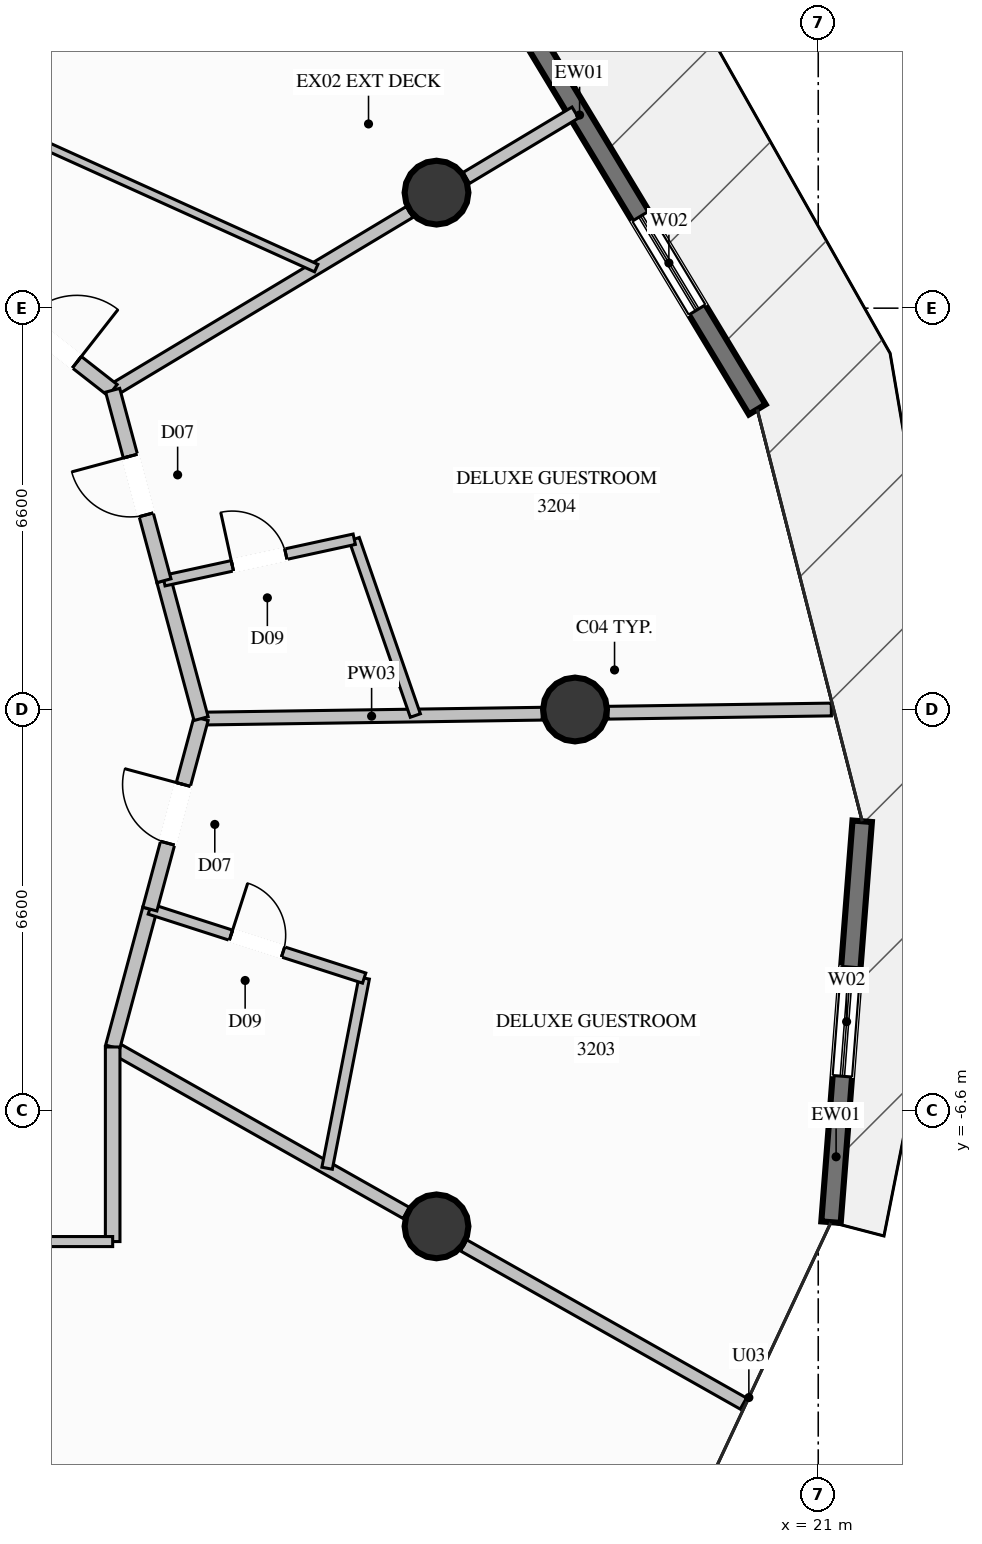
"""IFC4 building model, lengths in metres.
Left out: names, types, materials, properties, quantities, classifications, styles, units other than length and angle.
Written with IfcOpenShell. Run it as: python <this file> out.ifc"""

import sys

from ifc_helpers import new_model, si_unit, direction, frame, frame_2d, origin, origin_2d, place, context, subcontext, project, spatial, rectangle, circle, extrude, element, fill, save


model = new_model("IFC4")
c1 = context("Model", 3, precision=1e-05, world=origin(), true_north=direction((0.0, 1.0)))
c2 = subcontext(c1, "Body", "Model", "MODEL_VIEW")
j1 = project(units=[si_unit("LENGTHUNIT", "METRE"), si_unit("PLANEANGLEUNIT", "RADIAN")], contexts=[c1])
p1 = place(None, origin())
s1 = spatial("IfcSite", under=j1, at=p1, CompositionType="ELEMENT")
p2 = place(p1, origin())
s2 = spatial("IfcBuilding", under=s1, at=p2, CompositionType="ELEMENT")
p3 = place(p2, frame((0.0, 0.0, 120.6)))
s3 = spatial("IfcBuildingStorey", under=s2, at=p3, CompositionType="ELEMENT", Elevation=120.6)
for number, where, z_axis, x_axis in (
    (1, (17.0, 0.0, 0.0), (0.0, 0.0, 1.0), (1.0, 0.0, 0.0)),
    (2, (14.722, 8.5, 0.0), (0.0, 0.0, 1.0), (1.0, 0.0, 0.0)),
    (3, (14.722, -8.5, 0.0), (0.0, 0.0, 1.0), (1.0, 0.0, 0.0)),
):
    element("IfcColumn", number, at=place(p3, frame(where, z_axis=z_axis, x_axis=x_axis)), inside=s3, PredefinedType="COLUMN", context=c2, shape_type="SweptSolid", body=[
        extrude(circle(Radius=0.525, at=origin_2d()), origin(), (0.0, 0.0, 1.0), 3.6),
    ])
p4 = place(p3, frame((21.723, -1.838, 0.0), z_axis=(0.0, 0.0, 1.0), x_axis=(-0.077566011703, -0.996987218488, 0.0)))
e4 = element("IfcWall", 4, at=p4, inside=s3, PredefinedType="SOLIDWALL", context=c2, shape_type="SweptSolid", body=[
    extrude(rectangle(XDim=6.613, YDim=0.32, at=frame_2d((3.307, 0.0))), origin(), (0.0, 0.0, 1.0), 3.35),
])
p5 = place(p4, frame((2.406, 0.0, 0.35)))
e5 = element("IfcOpeningElement", 5, at=p5, cuts=e4, PredefinedType="OPENING", context=c2, shape_type="SweptSolid", body=[
    extrude(rectangle(XDim=1.8, YDim=2.6, at=frame_2d((0.9, 1.3))), frame((0.0, 0.17, 0.0), z_axis=(0.0, -1.0, 0.0), x_axis=(1.0, 0.0, 0.0)), (0.0, 0.0, 1.0), 0.34),
])
p6 = place(p3, frame((16.201, 11.225, 0.0), z_axis=(0.0, 0.0, 1.0), x_axis=(0.516707807554, -0.856161808079, 0.0)))
e6 = element("IfcWall", 6, at=p6, inside=s3, PredefinedType="SOLIDWALL", context=c2, shape_type="SweptSolid", body=[
    extrude(rectangle(XDim=7.347, YDim=0.32, at=frame_2d((3.673, 0.0))), origin(), (0.0, 0.0, 1.0), 3.35),
])
p7 = place(p6, frame((3.634, 0.0, 0.35)))
e7 = element("IfcOpeningElement", 7, at=p7, cuts=e6, PredefinedType="OPENING", context=c2, shape_type="SweptSolid", body=[
    extrude(rectangle(XDim=1.8, YDim=2.6, at=frame_2d((0.9, 1.3))), frame((0.0, 0.17, 0.0), z_axis=(0.0, -1.0, 0.0), x_axis=(1.0, 0.0, 0.0)), (0.0, 0.0, 1.0), 0.34),
])
p8 = place(p3, frame((10.85, -0.15, 0.0), z_axis=(0.0, 0.0, 1.0), x_axis=(0.999896226814, 0.014406096068, 0.0)))
e8 = element("IfcWall", 8, at=p8, inside=s3, PredefinedType="PARTITIONING", context=c2, shape_type="SweptSolid", body=[
    extrude(rectangle(XDim=5.609, YDim=0.21, at=frame_2d((2.805, 0.0))), origin(), (0.0, 0.0, 1.0), 3.35),
])
p9 = place(p3, frame((17.542, -0.053, 0.0), z_axis=(0.0, 0.0, 1.0), x_axis=(0.999895999044, 0.01442189643, 0.0)))
e9 = element("IfcWall", 9, at=p9, inside=s3, PredefinedType="PARTITIONING", context=c2, shape_type="SweptSolid", body=[
    extrude(rectangle(XDim=3.674, YDim=0.21, at=frame_2d((1.837, 0.0))), origin(), (0.0, 0.0, 1.0), 3.35),
])
p10 = place(p3, frame((9.396, 5.25, 0.0), z_axis=(0.0, 0.0, 1.0), x_axis=(0.857379456535, 0.514684823471, 0.0)))
e10 = element("IfcWall", 10, at=p10, inside=s3, PredefinedType="PARTITIONING", context=c2, shape_type="SweptSolid", body=[
    extrude(rectangle(XDim=5.697, YDim=0.21, at=frame_2d((2.848, 0.0))), origin(), (0.0, 0.0, 1.0), 2.719),
])
p11 = place(p3, frame((15.211, 8.741, 0.0), z_axis=(0.0, 0.0, 1.0), x_axis=(0.857462017951, 0.514547264857, 0.0)))
e11 = element("IfcWall", 11, at=p11, inside=s3, PredefinedType="PARTITIONING", context=c2, shape_type="SweptSolid", body=[
    extrude(rectangle(XDim=2.091, YDim=0.21, at=frame_2d((1.045, 0.0))), origin(), (0.0, 0.0, 1.0), 3.35),
])
p12 = place(p3, frame((9.396, -5.55, 0.0), z_axis=(0.0, 0.0, 1.0), x_axis=(0.870557919432, -0.492065959922, 0.0)))
e12 = element("IfcWall", 12, at=p12, inside=s3, PredefinedType="PARTITIONING", context=c2, shape_type="SweptSolid", body=[
    extrude(rectangle(XDim=5.546, YDim=0.21, at=frame_2d((2.773, 0.0))), origin(), (0.0, 0.0, 1.0), 2.719),
])
p13 = place(p3, frame((15.168, -8.813, 0.0), z_axis=(0.0, 0.0, 1.0), x_axis=(0.870524982939, -0.492124226267, 0.0)))
e13 = element("IfcWall", 13, at=p13, inside=s3, PredefinedType="PARTITIONING", context=c2, shape_type="SweptSolid", body=[
    extrude(rectangle(XDim=5.285, YDim=0.21, at=frame_2d((2.643, 0.0))), origin(), (0.0, 0.0, 1.0), 3.35),
])
p14 = place(p3, frame((7.35, 6.85, 0.0), z_axis=(0.0, 0.0, 1.0), x_axis=(0.7876993483, -0.6160598483, 0.0)))
e14 = element("IfcWall", 14, at=p14, inside=s3, PredefinedType="PARTITIONING", context=c2, shape_type="SweptSolid", body=[
    extrude(rectangle(XDim=2.597, YDim=0.24, at=frame_2d((1.299, 0.0))), origin(), (0.0, 0.0, 1.0), 3.35),
])
p15 = place(p14, frame((0.749, 0.0, 0.0)))
e15 = element("IfcOpeningElement", 15, at=p15, cuts=e14, PredefinedType="OPENING", context=c2, shape_type="SweptSolid", body=[
    extrude(rectangle(XDim=1.1, YDim=2.3, at=frame_2d((0.55, 1.15))), frame((0.0, 0.13, 0.0), z_axis=(0.0, -1.0, 0.0), x_axis=(1.0, 0.0, 0.0)), (0.0, 0.0, 1.0), 0.26),
])
p16 = place(p3, frame((0.0, 13.023, 0.0), z_axis=(0.0, 0.0, 1.0), x_axis=(0.911139602209, -0.412097834605, 0.0)))
e16 = element("IfcWall", 16, at=p16, inside=s3, PredefinedType="PARTITIONING", context=c2, shape_type="SweptSolid", body=[
    extrude(rectangle(XDim=13.987, YDim=0.135, at=frame_2d((6.993, 0.0))), origin(), (0.0, 0.0, 1.0), 3.35),
])
p17 = place(p16, frame((6.518, 0.0, 0.0)))
e17 = element("IfcOpeningElement", 17, at=p17, cuts=e16, PredefinedType="OPENING", context=c2, shape_type="SweptSolid", body=[
    extrude(rectangle(XDim=0.95, YDim=2.1, at=frame_2d((0.475, 1.05))), frame((0.0, 0.078, 0.0), z_axis=(0.0, -1.0, 0.0), x_axis=(1.0, 0.0, 0.0)), (0.0, 0.0, 1.0), 0.155),
])
p18 = place(p3, frame((9.396, -5.55, 0.0), z_axis=(0.0, 0.0, 1.0), x_axis=(0.260152382661, 0.965567572879, 0.0)))
e18 = element("IfcWall", 18, at=p18, inside=s3, PredefinedType="PARTITIONING", context=c2, shape_type="SweptSolid", body=[
    extrude(rectangle(XDim=2.349, YDim=0.24, at=frame_2d((1.174, 0.0))), origin(), (0.0, 0.0, 1.0), 3.35),
])
p19 = place(p3, frame((12.923, -7.544, 0.0), z_axis=(0.0, 0.0, 1.0), x_axis=(0.191132211705, 0.981564301332, 0.0)))
e19 = element("IfcWall", 19, at=p19, inside=s3, PredefinedType="PLUMBINGWALL", context=c2, shape_type="SweptSolid", body=[
    extrude(rectangle(XDim=3.186, YDim=0.175, at=frame_2d((1.593, 0.0))), origin(), (0.0, 0.0, 1.0), 3.35),
])
p20 = place(p3, frame((10.007, -3.282, 0.0), z_axis=(0.0, 0.0, 1.0), x_axis=(0.951870664492, -0.306499980553, 0.0)))
e20 = element("IfcWall", 20, at=p20, inside=s3, PredefinedType="PLUMBINGWALL", context=c2, shape_type="SweptSolid", body=[
    extrude(rectangle(XDim=3.703, YDim=0.175, at=frame_2d((1.852, 0.0))), origin(), (0.0, 0.0, 1.0), 3.35),
])
p21 = place(p20, frame((1.402, 0.0, 0.0)))
e21 = element("IfcOpeningElement", 21, at=p21, cuts=e20, PredefinedType="OPENING", context=c2, shape_type="SweptSolid", body=[
    extrude(rectangle(XDim=0.9, YDim=2.1, at=frame_2d((0.45, 1.05))), frame((0.0, 0.098, 0.0), z_axis=(0.0, -1.0, 0.0), x_axis=(1.0, 0.0, 0.0)), (0.0, 0.0, 1.0), 0.195),
])
p22 = place(p3, frame((10.007, -3.282, 0.0), z_axis=(0.0, 0.0, 1.0), x_axis=(0.259905989708, 0.965633924691, 0.0)))
e22 = element("IfcWall", 22, at=p22, inside=s3, PredefinedType="PARTITIONING", context=c2, shape_type="SweptSolid", body=[
    extrude(rectangle(XDim=3.244, YDim=0.24, at=frame_2d((1.622, 0.0))), origin(), (0.0, 0.0, 1.0), 3.35),
])
p23 = place(p22, frame((1.122, 0.0, 0.0)))
e23 = element("IfcOpeningElement", 23, at=p23, cuts=e22, PredefinedType="OPENING", context=c2, shape_type="SweptSolid", body=[
    extrude(rectangle(XDim=1.0, YDim=2.2, at=frame_2d((0.5, 1.1))), frame((0.0, 0.13, 0.0), z_axis=(0.0, -1.0, 0.0), x_axis=(1.0, 0.0, 0.0)), (0.0, 0.0, 1.0), 0.26),
])
p24 = place(p3, frame((10.85, -0.15, 0.0), z_axis=(0.0, 0.0, 1.0), x_axis=(-0.260178493416, 0.965560537493, 0.0)))
e24 = element("IfcWall", 24, at=p24, inside=s3, PredefinedType="PARTITIONING", context=c2, shape_type="SweptSolid", body=[
    extrude(rectangle(XDim=2.349, YDim=0.24, at=frame_2d((1.174, 0.0))), origin(), (0.0, 0.0, 1.0), 3.35),
])
p25 = place(p3, frame((14.374, -0.099, 0.0), z_axis=(0.0, 0.0, 1.0), x_axis=(-0.327566891518, 0.944827990473, 0.0)))
e25 = element("IfcWall", 25, at=p25, inside=s3, PredefinedType="PLUMBINGWALL", context=c2, shape_type="SweptSolid", body=[
    extrude(rectangle(XDim=3.068, YDim=0.175, at=frame_2d((1.534, 0.0))), origin(), (0.0, 0.0, 1.0), 3.35),
])
p26 = place(p3, frame((10.239, 2.118, 0.0), z_axis=(0.0, 0.0, 1.0), x_axis=(0.977064797309, 0.212942203095, 0.0)))
e26 = element("IfcWall", 26, at=p26, inside=s3, PredefinedType="PLUMBINGWALL", context=c2, shape_type="SweptSolid", body=[
    extrude(rectangle(XDim=3.203, YDim=0.175, at=frame_2d((1.602, 0.0))), origin(), (0.0, 0.0, 1.0), 3.35),
])
p27 = place(p26, frame((1.152, 0.0, 0.0)))
e27 = element("IfcOpeningElement", 27, at=p27, cuts=e26, PredefinedType="OPENING", context=c2, shape_type="SweptSolid", body=[
    extrude(rectangle(XDim=0.9, YDim=2.1, at=frame_2d((0.45, 1.05))), frame((0.0, 0.098, 0.0), z_axis=(0.0, -1.0, 0.0), x_axis=(1.0, 0.0, 0.0)), (0.0, 0.0, 1.0), 0.195),
])
p28 = place(p3, frame((10.239, 2.118, 0.0), z_axis=(0.0, 0.0, 1.0), x_axis=(-0.259905989708, 0.965633924691, 0.0)))
e28 = element("IfcWall", 28, at=p28, inside=s3, PredefinedType="PARTITIONING", context=c2, shape_type="SweptSolid", body=[
    extrude(rectangle(XDim=3.244, YDim=0.24, at=frame_2d((1.622, 0.0))), origin(), (0.0, 0.0, 1.0), 3.35),
])
p29 = place(p28, frame((1.122, 0.0, 0.0)))
e29 = element("IfcOpeningElement", 29, at=p29, cuts=e28, PredefinedType="OPENING", context=c2, shape_type="SweptSolid", body=[
    extrude(rectangle(XDim=1.0, YDim=2.2, at=frame_2d((0.5, 1.1))), frame((0.0, 0.13, 0.0), z_axis=(0.0, -1.0, 0.0), x_axis=(1.0, 0.0, 0.0)), (0.0, 0.0, 1.0), 0.26),
])
p30 = place(p3, frame((5.168, -8.75, 0.0), z_axis=(0.0, 0.0, 1.0), x_axis=(0.390450185433, -0.920624056114, 0.0)))
e30 = element("IfcWall", 30, at=p30, inside=s3, PredefinedType="PARTITIONING", context=c2, shape_type="SweptSolid", body=[
    extrude(rectangle(XDim=12.394, YDim=0.21, at=frame_2d((6.197, 0.0))), origin(), (0.0, 0.0, 1.0), 3.35),
])
p31 = place(p3, frame((9.396, -8.75, 0.0), z_axis=(0.0, 0.0, 1.0), x_axis=(0.0, 1.0, 0.0)))
e31 = element("IfcWall", 31, at=p31, inside=s3, PredefinedType="PARTITIONING", context=c2, shape_type="SweptSolid", body=[
    extrude(rectangle(XDim=3.2, YDim=0.24, at=frame_2d((1.6, 0.0))), origin(), (0.0, 0.0, 1.0), 3.35),
])
p32 = place(p3, frame((5.168, -8.75, 0.0), z_axis=(0.0, 0.0, 1.0), x_axis=(1.0, 0.0, 0.0)))
e32 = element("IfcWall", 32, at=p32, inside=s3, PredefinedType="PARTITIONING", context=c2, shape_type="SweptSolid", body=[
    extrude(rectangle(XDim=4.228, YDim=0.165, at=frame_2d((2.114, 0.0))), origin(), (0.0, 0.0, 1.0), 3.35),
])
p33 = place(p32, frame((1.639, 0.0, 0.0)))
e33 = element("IfcOpeningElement", 33, at=p33, cuts=e32, PredefinedType="OPENING", context=c2, shape_type="SweptSolid", body=[
    extrude(rectangle(XDim=0.95, YDim=2.1, at=frame_2d((0.475, 1.05))), frame((0.0, 0.093, 0.0), z_axis=(0.0, -1.0, 0.0), x_axis=(1.0, 0.0, 0.0)), (0.0, 0.0, 1.0), 0.185),
])
p34 = place(p5, origin())
e34 = element("IfcWindow", 34, at=p34, inside=s3, PartitioningType="SINGLE_PANEL", PredefinedType="WINDOW", context=c2, shape_type="SweptSolid", body=[
    extrude(rectangle(XDim=1.8, YDim=2.6, at=frame_2d((0.9, 1.3))), frame((0.0, 0.03, 0.0), z_axis=(0.0, -1.0, 0.0), x_axis=(1.0, 0.0, 0.0)), (0.0, 0.0, 1.0), 0.06),
])
fill(e5, e34)
p35 = place(p7, origin())
e35 = element("IfcWindow", 35, at=p35, inside=s3, PartitioningType="SINGLE_PANEL", PredefinedType="WINDOW", context=c2, shape_type="SweptSolid", body=[
    extrude(rectangle(XDim=1.8, YDim=2.6, at=frame_2d((0.9, 1.3))), frame((0.0, 0.03, 0.0), z_axis=(0.0, -1.0, 0.0), x_axis=(1.0, 0.0, 0.0)), (0.0, 0.0, 1.0), 0.06),
])
fill(e7, e35)
p36 = place(p15, origin())
e36 = element("IfcDoor", 36, at=p36, inside=s3, OperationType="SINGLE_SWING_RIGHT", PredefinedType="DOOR", context=c2, shape_type="SweptSolid", body=[
    extrude(rectangle(XDim=1.1, YDim=2.3, at=frame_2d((0.55, 1.15))), frame((0.0, 0.025, 0.0), z_axis=(0.0, -1.0, 0.0), x_axis=(1.0, 0.0, 0.0)), (0.0, 0.0, 1.0), 0.05),
])
fill(e15, e36)
p37 = place(p21, origin())
e37 = element("IfcDoor", 37, at=p37, inside=s3, OperationType="SINGLE_SWING_LEFT", PredefinedType="DOOR", context=c2, shape_type="SweptSolid", body=[
    extrude(rectangle(XDim=0.9, YDim=2.1, at=frame_2d((0.45, 1.05))), frame((0.0, 0.025, 0.0), z_axis=(0.0, -1.0, 0.0), x_axis=(1.0, 0.0, 0.0)), (0.0, 0.0, 1.0), 0.05),
])
fill(e21, e37)
p38 = place(p23, origin())
e38 = element("IfcDoor", 38, at=p38, inside=s3, OperationType="SINGLE_SWING_RIGHT", PredefinedType="DOOR", context=c2, shape_type="SweptSolid", body=[
    extrude(rectangle(XDim=1.0, YDim=2.2, at=frame_2d((0.5, 1.1))), frame((0.0, 0.025, 0.0), z_axis=(0.0, -1.0, 0.0), x_axis=(1.0, 0.0, 0.0)), (0.0, 0.0, 1.0), 0.05),
])
fill(e23, e38)
p39 = place(p27, origin())
e39 = element("IfcDoor", 39, at=p39, inside=s3, OperationType="SINGLE_SWING_LEFT", PredefinedType="DOOR", context=c2, shape_type="SweptSolid", body=[
    extrude(rectangle(XDim=0.9, YDim=2.1, at=frame_2d((0.45, 1.05))), frame((0.0, 0.025, 0.0), z_axis=(0.0, -1.0, 0.0), x_axis=(1.0, 0.0, 0.0)), (0.0, 0.0, 1.0), 0.05),
])
fill(e27, e39)
p40 = place(p29, origin())
e40 = element("IfcDoor", 40, at=p40, inside=s3, OperationType="SINGLE_SWING_RIGHT", PredefinedType="DOOR", context=c2, shape_type="SweptSolid", body=[
    extrude(rectangle(XDim=1.0, YDim=2.2, at=frame_2d((0.5, 1.1))), frame((0.0, 0.025, 0.0), z_axis=(0.0, -1.0, 0.0), x_axis=(1.0, 0.0, 0.0)), (0.0, 0.0, 1.0), 0.05),
])
fill(e29, e40)
save(model, sys.argv[1])
